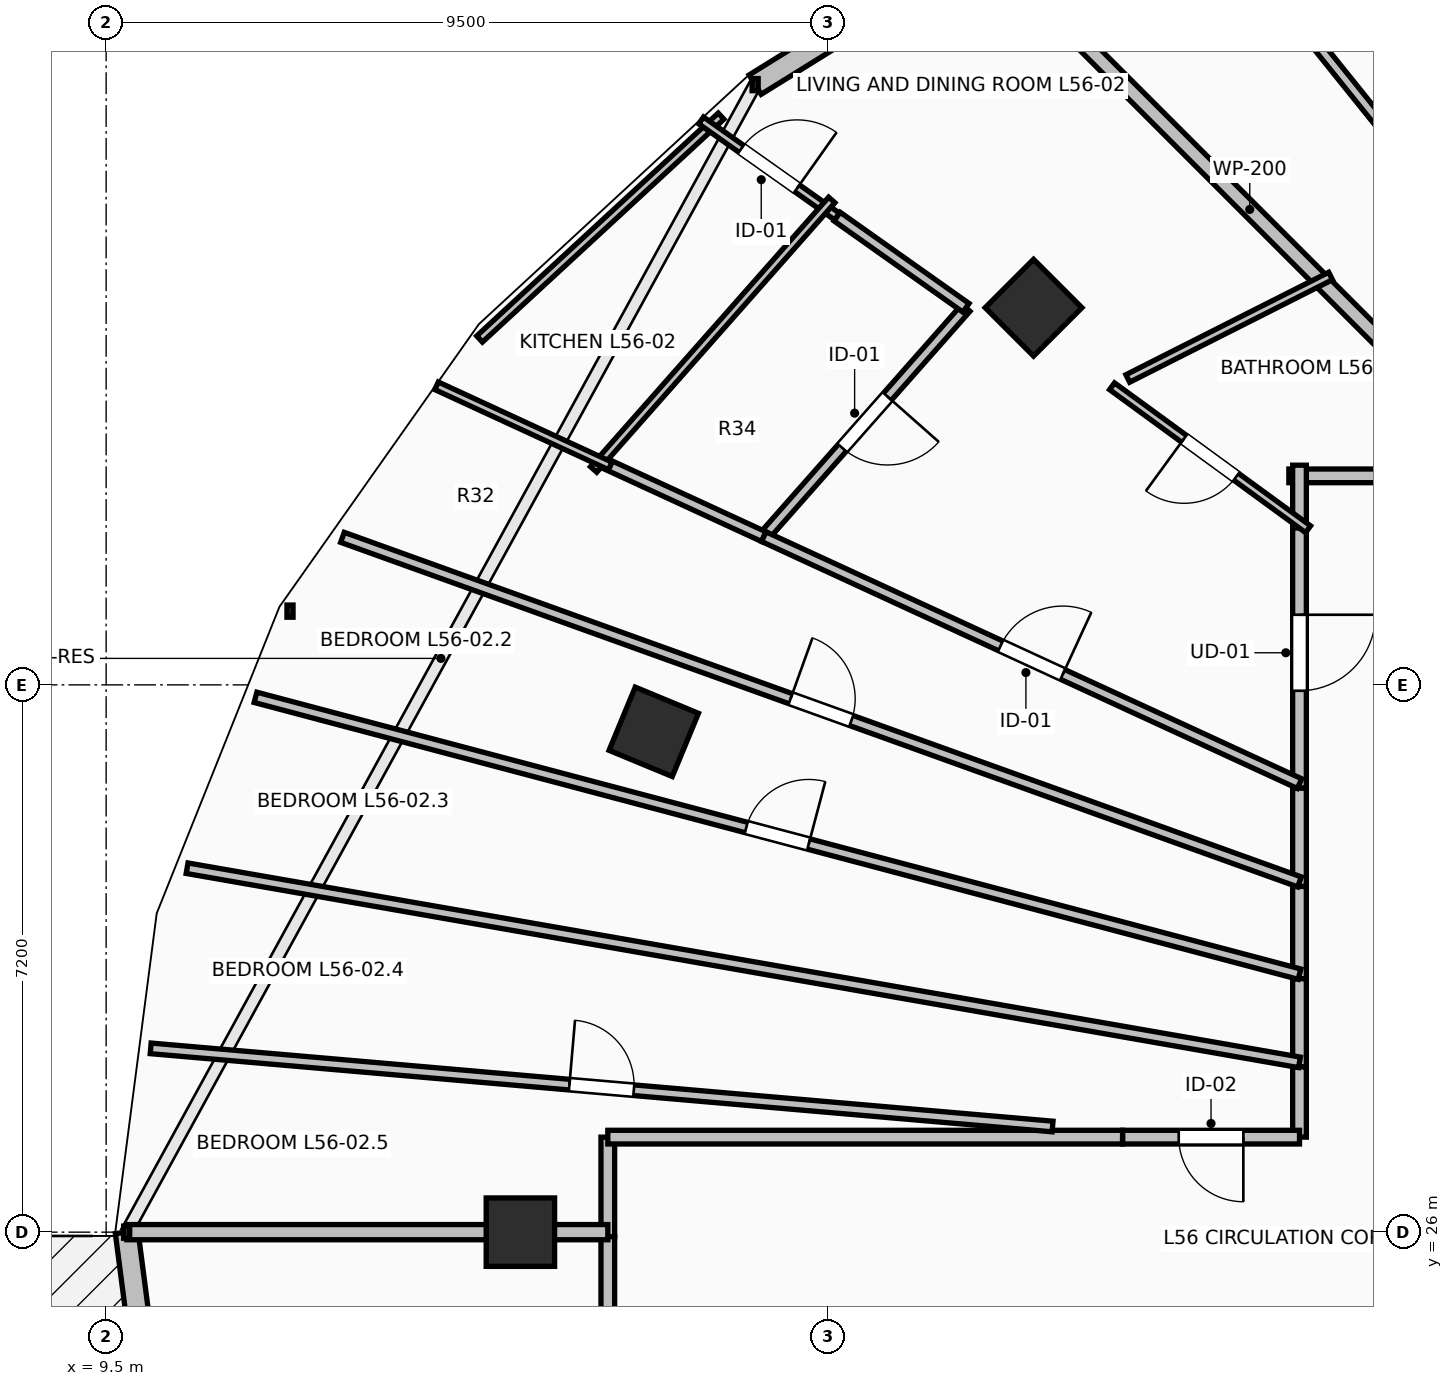
"""IFC4 building model, lengths in metres.
Left out: names, types, materials, properties, quantities, classifications, styles, units other than length and angle.
Written with IfcOpenShell. Run it as: python <this file> out.ifc"""

import sys

from ifc_helpers import new_model, si_unit, direction, frame, frame_2d, origin, origin_2d, place, context, subcontext, project, spatial, rectangle, extrude, element, fill, save


model = new_model("IFC4")
c1 = context("Model", 3, precision=1e-05, world=origin(), true_north=direction((0.0, 1.0)))
c2 = subcontext(c1, "Body", "Model", "MODEL_VIEW")
j1 = project(units=[si_unit("LENGTHUNIT", "METRE"), si_unit("PLANEANGLEUNIT", "RADIAN")], contexts=[c1])
p1 = place(None, origin())
s1 = spatial("IfcSite", under=j1, at=p1, CompositionType="ELEMENT")
p2 = place(p1, origin())
s2 = spatial("IfcBuilding", under=s1, at=p2, CompositionType="ELEMENT")
p3 = place(p2, frame((0.0, 0.0, 207.2)))
s3 = spatial("IfcBuildingStorey", under=s2, at=p3, CompositionType="ELEMENT", Elevation=207.2)
for number, where, z_axis, x_axis in (
    (1, (21.701, 38.162, 0.0), (0.0, 0.0, 1.0), (-0.707, 0.707, 0.0)),
    (2, (16.705, 32.582, 0.0), (0.0, 0.0, 1.0), (-0.924, 0.383, 0.0)),
    (3, (14.95, 26.0, 0.0), (0.0, 0.0, 1.0), (-1.0, 0.0, 0.0)),
):
    element("IfcColumn", number, at=place(p3, frame(where, z_axis=z_axis, x_axis=x_axis)), inside=s3, PredefinedType="COLUMN", context=c2, shape_type="SweptSolid", body=[
        extrude(rectangle(XDim=0.9, YDim=0.9, at=origin_2d()), origin(), (0.0, 0.0, 1.0), 3.55),
    ])
p4 = place(p3, frame((22.316, 43.752, 0.0), z_axis=(0.0, 0.0, 1.0), x_axis=(-0.849647657754, -0.527350791858, 0.0)))
e4 = element("IfcWall", 4, at=p4, inside=s3, PredefinedType="STANDARD", context=c2, shape_type="SweptSolid", body=[
    extrude(rectangle(XDim=5.035, YDim=0.3, at=frame_2d((2.518, 0.0))), origin(), (0.0, 0.0, 1.0), 3.29),
])
p5 = place(p4, frame((0.199, 0.0, 0.85)))
e5 = element("IfcOpeningElement", 5, at=p5, cuts=e4, PredefinedType="OPENING", context=c2, shape_type="SweptSolid", body=[
    extrude(rectangle(XDim=0.9, YDim=1.8, at=frame_2d((0.45, 0.9))), frame((0.0, 0.165, 0.0), z_axis=(0.0, -1.0, 0.0), x_axis=(1.0, 0.0, 0.0)), (0.0, 0.0, 1.0), 0.33),
])
p6 = place(p3, frame((9.77, 26.0, 0.0), z_axis=(0.0, 0.0, 1.0), x_axis=(0.129147853268, -0.991625348605, 0.0)))
e6 = element("IfcWall", 6, at=p6, inside=s3, PredefinedType="STANDARD", context=c2, shape_type="SweptSolid", body=[
    extrude(rectangle(XDim=4.2, YDim=0.3, at=frame_2d((2.1, 0.0))), origin(), (0.0, 0.0, 1.0), 3.29),
])
p7 = place(p6, frame((1.3, 0.0, 0.0)))
e7 = element("IfcOpeningElement", 7, at=p7, cuts=e6, PredefinedType="OPENING", context=c2, shape_type="SweptSolid", body=[
    extrude(rectangle(XDim=1.6, YDim=2.3, at=frame_2d((0.8, 1.15))), frame((0.0, 0.165, 0.0), z_axis=(0.0, -1.0, 0.0), x_axis=(1.0, 0.0, 0.0)), (0.0, 0.0, 1.0), 0.33),
])
p8 = place(p3, frame((25.2, 35.404, 0.0), z_axis=(0.0, 0.0, 1.0), x_axis=(0.0, -1.0, 0.0)))
e8 = element("IfcWall", 8, at=p8, inside=s3, PredefinedType="PARTITIONING", context=c2, shape_type="SweptSolid", body=[
    extrude(rectangle(XDim=3.563, YDim=0.18, at=frame_2d((1.781, 0.0))), origin(), (0.0, 0.0, 1.0), 2.482),
])
p9 = place(p8, frame((1.281, 0.0, 0.0)))
e9 = element("IfcOpeningElement", 9, at=p9, cuts=e8, PredefinedType="OPENING", context=c2, shape_type="SweptSolid", body=[
    extrude(rectangle(XDim=1.0, YDim=2.15, at=frame_2d((0.5, 1.075))), frame((0.0, 0.105, 0.0), z_axis=(0.0, -1.0, 0.0), x_axis=(1.0, 0.0, 0.0)), (0.0, 0.0, 1.0), 0.21),
])
p10 = place(p3, frame((28.105, 35.95, 0.0), z_axis=(0.0, 0.0, 1.0), x_axis=(-1.0, 0.0, 0.0)))
e10 = element("IfcWall", 10, at=p10, inside=s3, PredefinedType="PARTITIONING", context=c2, shape_type="SweptSolid", body=[
    extrude(rectangle(XDim=3.045, YDim=0.18, at=frame_2d((1.522, 0.0))), origin(), (0.0, 0.0, 1.0), 2.482),
])
p11 = place(p3, frame((25.2, 36.09, 0.0), z_axis=(0.0, 0.0, 1.0), x_axis=(0.0, -1.0, 0.0)))
e11 = element("IfcWall", 11, at=p11, inside=s3, PredefinedType="PARTITIONING", context=c2, shape_type="SweptSolid", body=[
    extrude(rectangle(XDim=0.826, YDim=0.18, at=frame_2d((0.413, 0.0))), origin(), (0.0, 0.0, 1.0), 2.482),
])
p12 = place(p3, frame((25.2, 31.841, 0.0), z_axis=(0.0, 0.0, 1.0), x_axis=(0.0, -1.0, 0.0)))
e12 = element("IfcWall", 12, at=p12, inside=s3, PredefinedType="PARTITIONING", context=c2, shape_type="SweptSolid", body=[
    extrude(rectangle(XDim=1.293, YDim=0.18, at=frame_2d((0.646, 0.0))), origin(), (0.0, 0.0, 1.0), 3.29),
])
p13 = place(p3, frame((25.2, 30.548, 0.0), z_axis=(0.0, 0.0, 1.0), x_axis=(0.0, -1.0, 0.0)))
e13 = element("IfcWall", 13, at=p13, inside=s3, PredefinedType="PARTITIONING", context=c2, shape_type="SweptSolid", body=[
    extrude(rectangle(XDim=1.214, YDim=0.18, at=frame_2d((0.607, 0.0))), origin(), (0.0, 0.0, 1.0), 2.482),
])
p14 = place(p3, frame((25.2, 29.334, 0.0), z_axis=(0.0, 0.0, 1.0), x_axis=(0.0, -1.0, 0.0)))
e14 = element("IfcWall", 14, at=p14, inside=s3, PredefinedType="PARTITIONING", context=c2, shape_type="SweptSolid", body=[
    extrude(rectangle(XDim=1.16, YDim=0.18, at=frame_2d((0.58, 0.0))), origin(), (0.0, 0.0, 1.0), 2.482),
])
p15 = place(p3, frame((25.2, 28.174, 0.0), z_axis=(0.0, 0.0, 1.0), x_axis=(0.0, -1.0, 0.0)))
e15 = element("IfcWall", 15, at=p15, inside=s3, PredefinedType="PARTITIONING", context=c2, shape_type="SweptSolid", body=[
    extrude(rectangle(XDim=0.924, YDim=0.18, at=frame_2d((0.462, 0.0))), origin(), (0.0, 0.0, 1.0), 2.482),
])
p16 = place(p3, frame((25.2, 27.25, 0.0), z_axis=(0.0, 0.0, 1.0), x_axis=(-1.0, 0.0, 0.0)))
e16 = element("IfcWall", 16, at=p16, inside=s3, PredefinedType="PARTITIONING", context=c2, shape_type="SweptSolid", body=[
    extrude(rectangle(XDim=2.328, YDim=0.18, at=frame_2d((1.164, 0.0))), origin(), (0.0, 0.0, 1.0), 2.482),
])
p17 = place(p16, frame((0.739, 0.0, 0.0)))
e17 = element("IfcOpeningElement", 17, at=p17, cuts=e16, PredefinedType="OPENING", context=c2, shape_type="SweptSolid", body=[
    extrude(rectangle(XDim=0.85, YDim=2.1, at=frame_2d((0.425, 1.05))), frame((0.0, 0.105, 0.0), z_axis=(0.0, -1.0, 0.0), x_axis=(1.0, 0.0, 0.0)), (0.0, 0.0, 1.0), 0.21),
])
p18 = place(p3, frame((16.1, 27.25, 0.0), z_axis=(0.0, 0.0, 1.0), x_axis=(0.0, -1.0, 0.0)))
e18 = element("IfcWall", 18, at=p18, inside=s3, PredefinedType="PARTITIONING", context=c2, shape_type="SweptSolid", body=[
    extrude(rectangle(XDim=1.31, YDim=0.18, at=frame_2d((0.655, 0.0))), origin(), (0.0, 0.0, 1.0), 2.482),
])
p19 = place(p3, frame((22.872, 27.25, 0.0), z_axis=(0.0, 0.0, 1.0), x_axis=(-1.0, 0.0, 0.0)))
e19 = element("IfcWall", 19, at=p19, inside=s3, PredefinedType="PARTITIONING", context=c2, shape_type="SweptSolid", body=[
    extrude(rectangle(XDim=6.772, YDim=0.18, at=frame_2d((3.386, 0.0))), origin(), (0.0, 0.0, 1.0), 2.482),
])
p20 = place(p3, frame((16.1, 25.94, 0.0), z_axis=(0.0, 0.0, 1.0), x_axis=(0.0, -1.0, 0.0)))
e20 = element("IfcWall", 20, at=p20, inside=s3, PredefinedType="PARTITIONING", context=c2, shape_type="SweptSolid", body=[
    extrude(rectangle(XDim=1.39, YDim=0.18, at=frame_2d((0.695, 0.0))), origin(), (0.0, 0.0, 1.0), 2.482),
])
p21 = place(p3, frame((25.749, 45.138, 0.0), z_axis=(0.0, 0.0, 1.0), x_axis=(0.539168632786, -0.842197830335, 0.0)))
e21 = element("IfcWall", 21, at=p21, inside=s3, PredefinedType="PARTITIONING", context=c2, shape_type="SweptSolid", body=[
    extrude(rectangle(XDim=10.909, YDim=0.14, at=frame_2d((5.455, 0.0))), origin(), (0.0, 0.0, 1.0), 2.482),
])
p22 = place(p3, frame((23.378, 44.178, 0.0), z_axis=(0.0, 0.0, 1.0), x_axis=(0.626756813732, -0.779214923137, 0.0)))
e22 = element("IfcWall", 22, at=p22, inside=s3, PredefinedType="PARTITIONING", context=c2, shape_type="SweptSolid", body=[
    extrude(rectangle(XDim=10.559, YDim=0.14, at=frame_2d((5.28, 0.0))), origin(), (0.0, 0.0, 1.0), 2.482),
])
p23 = place(p3, frame((21.041, 42.959, 0.0), z_axis=(0.0, 0.0, 1.0), x_axis=(0.707106781187, -0.707106781187, 0.0)))
e23 = element("IfcWall", 23, at=p23, inside=s3, PredefinedType="PARTITIONING", context=c2, shape_type="SweptSolid", body=[
    extrude(rectangle(XDim=9.912, YDim=0.2, at=frame_2d((4.956, 0.0))), origin(), (0.0, 0.0, 1.0), 2.482),
])
p24 = place(p3, frame((25.313, 35.248, 0.0), z_axis=(0.0, 0.0, 1.0), x_axis=(-0.807968083988, 0.58922625133, 0.0)))
e24 = element("IfcWall", 24, at=p24, inside=s3, PredefinedType="PARTITIONING", context=c2, shape_type="SweptSolid", body=[
    extrude(rectangle(XDim=3.192, YDim=0.11, at=frame_2d((1.596, 0.0))), origin(), (0.0, 0.0, 1.0), 2.482),
])
p25 = place(p24, frame((1.171, 0.0, 0.0)))
e25 = element("IfcOpeningElement", 25, at=p25, cuts=e24, PredefinedType="OPENING", context=c2, shape_type="SweptSolid", body=[
    extrude(rectangle(XDim=0.85, YDim=2.1, at=frame_2d((0.425, 1.05))), frame((0.0, 0.07, 0.0), z_axis=(0.0, -1.0, 0.0), x_axis=(1.0, 0.0, 0.0)), (0.0, 0.0, 1.0), 0.14),
])
p26 = place(p3, frame((22.941, 37.231, 0.0), z_axis=(0.0, 0.0, 1.0), x_axis=(0.892507731149, 0.451032094024, 0.0)))
e26 = element("IfcWall", 26, at=p26, inside=s3, PredefinedType="PARTITIONING", context=c2, shape_type="SweptSolid", body=[
    extrude(rectangle(XDim=2.989, YDim=0.11, at=frame_2d((1.495, 0.0))), origin(), (0.0, 0.0, 1.0), 2.482),
])
p27 = place(p3, frame((17.59, 40.682, 0.0), z_axis=(0.0, 0.0, 1.0), x_axis=(-0.734861902375, -0.678216768031, 0.0)))
e27 = element("IfcWall", 27, at=p27, inside=s3, PredefinedType="PARTITIONING", context=c2, shape_type="SweptSolid", body=[
    extrude(rectangle(XDim=4.323, YDim=0.11, at=frame_2d((2.162, 0.0))), origin(), (0.0, 0.0, 1.0), 3.29),
])
p28 = place(p3, frame((17.328, 40.626, 0.0), z_axis=(0.0, 0.0, 1.0), x_axis=(0.816448938693, -0.577417639588, 0.0)))
e28 = element("IfcWall", 28, at=p28, inside=s3, PredefinedType="PARTITIONING", context=c2, shape_type="SweptSolid", body=[
    extrude(rectangle(XDim=2.192, YDim=0.11, at=frame_2d((1.096, 0.0))), origin(), (0.0, 0.0, 1.0), 3.29),
])
p29 = place(p28, frame((0.646, 0.0, 0.0)))
e29 = element("IfcOpeningElement", 29, at=p29, cuts=e28, PredefinedType="OPENING", context=c2, shape_type="SweptSolid", body=[
    extrude(rectangle(XDim=0.9, YDim=2.1, at=frame_2d((0.45, 1.05))), frame((0.0, 0.07, 0.0), z_axis=(0.0, -1.0, 0.0), x_axis=(1.0, 0.0, 0.0)), (0.0, 0.0, 1.0), 0.14),
])
p30 = place(p3, frame((20.812, 38.161, 0.0), z_axis=(0.0, 0.0, 1.0), x_axis=(-0.662063683649, -0.749447582418, 0.0)))
e30 = element("IfcWall", 30, at=p30, inside=s3, PredefinedType="PARTITIONING", context=c2, shape_type="SweptSolid", body=[
    extrude(rectangle(XDim=4.018, YDim=0.14, at=frame_2d((2.009, 0.0))), origin(), (0.0, 0.0, 1.0), 3.29),
])
p31 = place(p30, frame((1.559, 0.0, 0.0)))
e31 = element("IfcOpeningElement", 31, at=p31, cuts=e30, PredefinedType="OPENING", context=c2, shape_type="SweptSolid", body=[
    extrude(rectangle(XDim=0.9, YDim=2.1, at=frame_2d((0.45, 1.05))), frame((0.0, 0.085, 0.0), z_axis=(0.0, -1.0, 0.0), x_axis=(1.0, 0.0, 0.0)), (0.0, 0.0, 1.0), 0.17),
])
p32 = place(p3, frame((18.152, 35.15, 0.0), z_axis=(0.0, 0.0, 1.0), x_axis=(-0.908192094718, 0.418553603607, 0.0)))
e32 = element("IfcWall", 32, at=p32, inside=s3, PredefinedType="PARTITIONING", context=c2, shape_type="SweptSolid", body=[
    extrude(rectangle(XDim=2.363, YDim=0.14, at=frame_2d((1.182, 0.0))), origin(), (0.0, 0.0, 1.0), 3.29),
])
p33 = place(p3, frame((19.117, 39.36, 0.0), z_axis=(0.0, 0.0, 1.0), x_axis=(0.816315567802, -0.577606175316, 0.0)))
e33 = element("IfcWall", 33, at=p33, inside=s3, PredefinedType="PARTITIONING", context=c2, shape_type="SweptSolid", body=[
    extrude(rectangle(XDim=2.076, YDim=0.14, at=frame_2d((1.038, 0.0))), origin(), (0.0, 0.0, 1.0), 3.29),
])
p34 = place(p3, frame((18.152, 35.15, 0.0), z_axis=(0.0, 0.0, 1.0), x_axis=(0.908152637685, -0.418639208227, 0.0)))
e34 = element("IfcWall", 34, at=p34, inside=s3, PredefinedType="PARTITIONING", context=c2, shape_type="SweptSolid", body=[
    extrude(rectangle(XDim=7.761, YDim=0.14, at=frame_2d((3.88, 0.0))), origin(), (0.0, 0.0, 1.0), 2.824),
])
p35 = place(p34, frame((3.43, 0.0, 0.0)))
e35 = element("IfcOpeningElement", 35, at=p35, cuts=e34, PredefinedType="OPENING", context=c2, shape_type="SweptSolid", body=[
    extrude(rectangle(XDim=0.9, YDim=2.1, at=frame_2d((0.45, 1.05))), frame((0.0, 0.085, 0.0), z_axis=(0.0, -1.0, 0.0), x_axis=(1.0, 0.0, 0.0)), (0.0, 0.0, 1.0), 0.17),
])
p36 = place(p3, frame((15.913, 36.034, 0.0), z_axis=(0.0, 0.0, 1.0), x_axis=(0.662189711464, 0.749336230294, 0.0)))
e36 = element("IfcWall", 36, at=p36, inside=s3, PredefinedType="PARTITIONING", context=c2, shape_type="SweptSolid", body=[
    extrude(rectangle(XDim=4.732, YDim=0.11, at=frame_2d((2.366, 0.0))), origin(), (0.0, 0.0, 1.0), 3.29),
])
p37 = place(p3, frame((13.847, 37.135, 0.0), z_axis=(0.0, 0.0, 1.0), x_axis=(0.908101251341, -0.418750662462, 0.0)))
e37 = element("IfcWall", 37, at=p37, inside=s3, PredefinedType="PARTITIONING", context=c2, shape_type="SweptSolid", body=[
    extrude(rectangle(XDim=2.518, YDim=0.11, at=frame_2d((1.259, 0.0))), origin(), (0.0, 0.0, 1.0), 3.29),
])
p38 = place(p3, frame((12.609, 35.141, 0.0), z_axis=(0.0, 0.0, 1.0), x_axis=(0.940877411069, -0.338747246985, 0.0)))
e38 = element("IfcWall", 38, at=p38, inside=s3, PredefinedType="PARTITIONING", context=c2, shape_type="SweptSolid", body=[
    extrude(rectangle(XDim=13.382, YDim=0.14, at=frame_2d((6.691, 0.0))), origin(), (0.0, 0.0, 1.0), 2.824),
])
p39 = place(p38, frame((6.266, 0.0, 0.0)))
e39 = element("IfcOpeningElement", 39, at=p39, cuts=e38, PredefinedType="OPENING", context=c2, shape_type="SweptSolid", body=[
    extrude(rectangle(XDim=0.85, YDim=2.1, at=frame_2d((0.425, 1.05))), frame((0.0, 0.085, 0.0), z_axis=(0.0, -1.0, 0.0), x_axis=(1.0, 0.0, 0.0)), (0.0, 0.0, 1.0), 0.17),
])
p40 = place(p3, frame((11.465, 33.036, 0.0), z_axis=(0.0, 0.0, 1.0), x_axis=(0.966598137313, -0.256296782934, 0.0)))
e40 = element("IfcWall", 40, at=p40, inside=s3, PredefinedType="PARTITIONING", context=c2, shape_type="SweptSolid", body=[
    extrude(rectangle(XDim=14.209, YDim=0.14, at=frame_2d((7.105, 0.0))), origin(), (0.0, 0.0, 1.0), 2.482),
])
p41 = place(p40, frame((6.68, 0.0, 0.0)))
e41 = element("IfcOpeningElement", 41, at=p41, cuts=e40, PredefinedType="OPENING", context=c2, shape_type="SweptSolid", body=[
    extrude(rectangle(XDim=0.85, YDim=2.1, at=frame_2d((0.425, 1.05))), frame((0.0, 0.085, 0.0), z_axis=(0.0, -1.0, 0.0), x_axis=(1.0, 0.0, 0.0)), (0.0, 0.0, 1.0), 0.17),
])
p42 = place(p3, frame((10.565, 30.788, 0.0), z_axis=(0.0, 0.0, 1.0), x_axis=(0.985109541297, -0.171927867563, 0.0)))
e42 = element("IfcWall", 42, at=p42, inside=s3, PredefinedType="PARTITIONING", context=c2, shape_type="SweptSolid", body=[
    extrude(rectangle(XDim=14.856, YDim=0.14, at=frame_2d((7.428, 0.0))), origin(), (0.0, 0.0, 1.0), 2.824),
])
p43 = place(p3, frame((10.086, 28.418, 0.0), z_axis=(0.0, 0.0, 1.0), x_axis=(0.996267232338, -0.08632266081, 0.0)))
e43 = element("IfcWall", 43, at=p43, inside=s3, PredefinedType="PARTITIONING", context=c2, shape_type="SweptSolid", body=[
    extrude(rectangle(XDim=11.91, YDim=0.14, at=frame_2d((5.955, 0.0))), origin(), (0.0, 0.0, 1.0), 2.482),
])
p44 = place(p43, frame((5.53, 0.0, 0.0)))
e44 = element("IfcOpeningElement", 44, at=p44, cuts=e43, PredefinedType="OPENING", context=c2, shape_type="SweptSolid", body=[
    extrude(rectangle(XDim=0.85, YDim=2.1, at=frame_2d((0.425, 1.05))), frame((0.0, 0.085, 0.0), z_axis=(0.0, -1.0, 0.0), x_axis=(1.0, 0.0, 0.0)), (0.0, 0.0, 1.0), 0.17),
])
p45 = place(p3, frame((9.771, 26.0, 0.0), z_axis=(0.0, 0.0, 1.0), x_axis=(1.0, 0.0, 0.0)))
e45 = element("IfcWall", 45, at=p45, inside=s3, PredefinedType="PARTITIONING", context=c2, shape_type="SweptSolid", body=[
    extrude(rectangle(XDim=6.329, YDim=0.2, at=frame_2d((3.165, 0.0))), origin(), (0.0, 0.0, 1.0), 2.482),
])
p46 = place(p9, origin())
e46 = element("IfcDoor", 46, at=p46, inside=s3, OperationType="SINGLE_SWING_LEFT", PredefinedType="DOOR", context=c2, shape_type="SweptSolid", body=[
    extrude(rectangle(XDim=1.0, YDim=2.15, at=frame_2d((0.5, 1.075))), frame((0.0, 0.025, 0.0), z_axis=(0.0, -1.0, 0.0), x_axis=(1.0, 0.0, 0.0)), (0.0, 0.0, 1.0), 0.05),
])
fill(e9, e46)
p47 = place(p25, origin())
e47 = element("IfcDoor", 47, at=p47, inside=s3, OperationType="SINGLE_SWING_RIGHT", PredefinedType="DOOR", context=c2, shape_type="SweptSolid", body=[
    extrude(rectangle(XDim=0.85, YDim=2.1, at=frame_2d((0.425, 1.05))), frame((0.0, 0.025, 0.0), z_axis=(0.0, -1.0, 0.0), x_axis=(1.0, 0.0, 0.0)), (0.0, 0.0, 1.0), 0.05),
])
fill(e25, e47)
p48 = place(p29, origin())
e48 = element("IfcDoor", 48, at=p48, inside=s3, OperationType="SINGLE_SWING_RIGHT", PredefinedType="DOOR", context=c2, shape_type="SweptSolid", body=[
    extrude(rectangle(XDim=0.9, YDim=2.1, at=frame_2d((0.45, 1.05))), frame((0.0, 0.025, 0.0), z_axis=(0.0, -1.0, 0.0), x_axis=(1.0, 0.0, 0.0)), (0.0, 0.0, 1.0), 0.05),
])
fill(e29, e48)
p49 = place(p31, origin())
e49 = element("IfcDoor", 49, at=p49, inside=s3, OperationType="SINGLE_SWING_LEFT", PredefinedType="DOOR", context=c2, shape_type="SweptSolid", body=[
    extrude(rectangle(XDim=0.9, YDim=2.1, at=frame_2d((0.45, 1.05))), frame((0.0, 0.025, 0.0), z_axis=(0.0, -1.0, 0.0), x_axis=(1.0, 0.0, 0.0)), (0.0, 0.0, 1.0), 0.05),
])
fill(e31, e49)
p50 = place(p35, origin())
e50 = element("IfcDoor", 50, at=p50, inside=s3, OperationType="SINGLE_SWING_RIGHT", PredefinedType="DOOR", context=c2, shape_type="SweptSolid", body=[
    extrude(rectangle(XDim=0.9, YDim=2.1, at=frame_2d((0.45, 1.05))), frame((0.0, 0.025, 0.0), z_axis=(0.0, -1.0, 0.0), x_axis=(1.0, 0.0, 0.0)), (0.0, 0.0, 1.0), 0.05),
])
fill(e35, e50)
p51 = place(p17, origin())
e51 = element("IfcDoor", 51, at=p51, inside=s3, OperationType="SINGLE_SWING_LEFT", PredefinedType="DOOR", context=c2, shape_type="SweptSolid", body=[
    extrude(rectangle(XDim=0.85, YDim=2.1, at=frame_2d((0.425, 1.05))), frame((0.0, 0.025, 0.0), z_axis=(0.0, -1.0, 0.0), x_axis=(1.0, 0.0, 0.0)), (0.0, 0.0, 1.0), 0.05),
])
fill(e17, e51)
p52 = place(p39, origin())
e52 = element("IfcDoor", 52, at=p52, inside=s3, OperationType="SINGLE_SWING_LEFT", PredefinedType="DOOR", context=c2, shape_type="SweptSolid", body=[
    extrude(rectangle(XDim=0.85, YDim=2.1, at=frame_2d((0.425, 1.05))), frame((0.0, 0.025, 0.0), z_axis=(0.0, -1.0, 0.0), x_axis=(1.0, 0.0, 0.0)), (0.0, 0.0, 1.0), 0.05),
])
fill(e39, e52)
p53 = place(p41, origin())
e53 = element("IfcDoor", 53, at=p53, inside=s3, OperationType="SINGLE_SWING_RIGHT", PredefinedType="DOOR", context=c2, shape_type="SweptSolid", body=[
    extrude(rectangle(XDim=0.85, YDim=2.1, at=frame_2d((0.425, 1.05))), frame((0.0, 0.025, 0.0), z_axis=(0.0, -1.0, 0.0), x_axis=(1.0, 0.0, 0.0)), (0.0, 0.0, 1.0), 0.05),
])
fill(e41, e53)
p54 = place(p44, origin())
e54 = element("IfcDoor", 54, at=p54, inside=s3, OperationType="SINGLE_SWING_LEFT", PredefinedType="DOOR", context=c2, shape_type="SweptSolid", body=[
    extrude(rectangle(XDim=0.85, YDim=2.1, at=frame_2d((0.425, 1.05))), frame((0.0, 0.025, 0.0), z_axis=(0.0, -1.0, 0.0), x_axis=(1.0, 0.0, 0.0)), (0.0, 0.0, 1.0), 0.05),
])
fill(e44, e54)
save(model, sys.argv[1])
